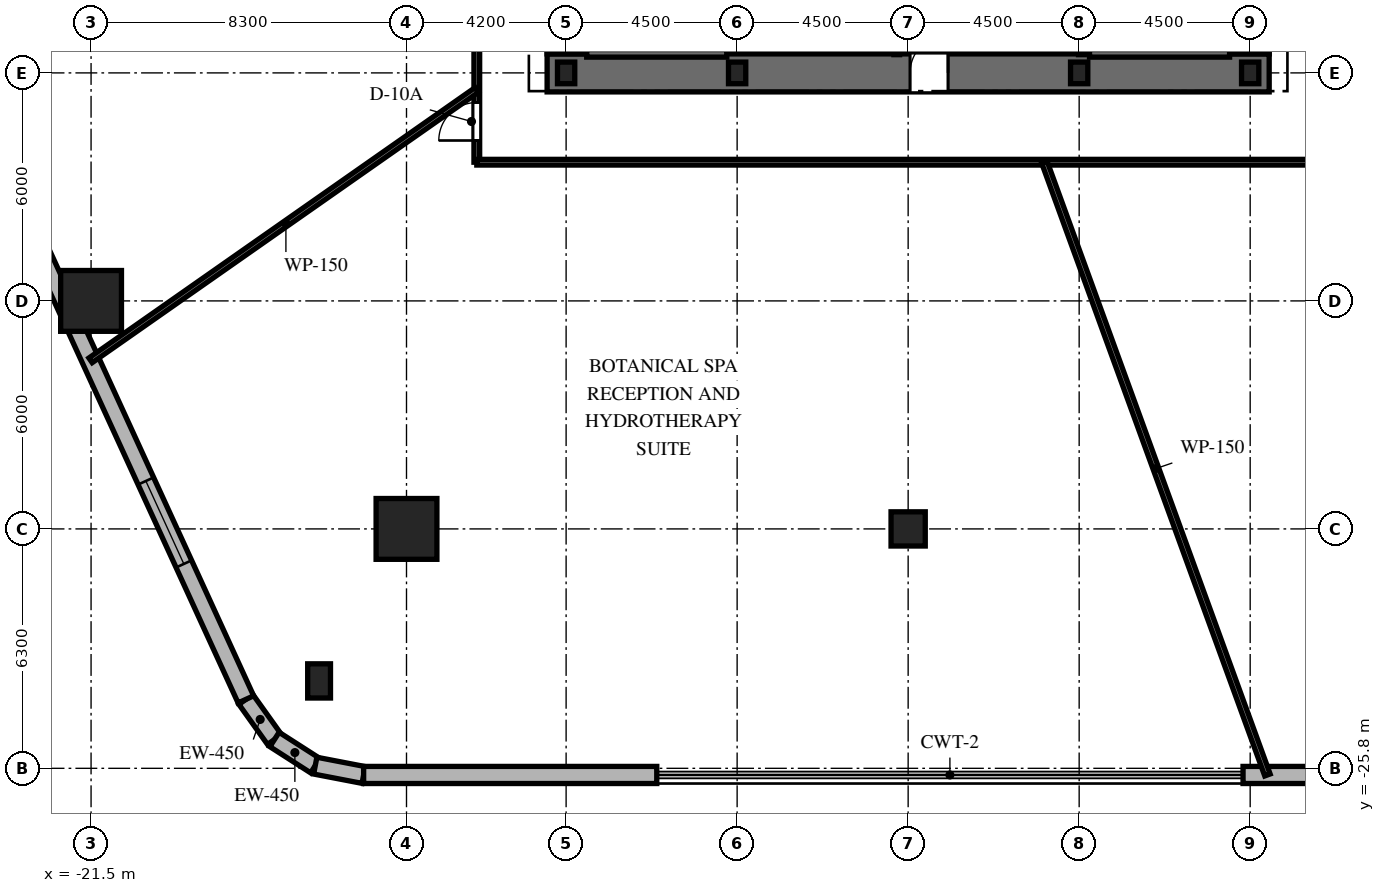
"""IFC4 building model, lengths in metres.
Left out: names, types, materials, properties, quantities, classifications, styles, units other than length and angle.
Written with IfcOpenShell. Run it as: python <this file> out.ifc"""

import sys

from ifc_helpers import new_model, si_unit, direction, frame, frame_2d, origin, origin_2d, place, context, subcontext, project, spatial, rectangle, circle, i_section, extrude, element, fill, save


model = new_model("IFC4")
c1 = context("Model", 3, precision=1e-05, world=origin(), true_north=direction((0.0, 1.0)))
c2 = subcontext(c1, "Body", "Model", "MODEL_VIEW")
j1 = project(units=[si_unit("LENGTHUNIT", "METRE"), si_unit("PLANEANGLEUNIT", "RADIAN")], contexts=[c1])
p1 = place(None, origin())
s1 = spatial("IfcSite", under=j1, at=p1, CompositionType="ELEMENT")
p2 = place(p1, origin())
s2 = spatial("IfcBuilding", under=s1, at=p2, CompositionType="ELEMENT")
p3 = place(p2, frame((0.0, 0.0, 23.4)))
s3 = spatial("IfcBuildingStorey", under=s2, at=p3, CompositionType="ELEMENT", Elevation=23.4)
p4 = place(p3, frame((-9.5, -7.5, 0.0), z_axis=(0.0, 0.0, 1.0), x_axis=(1.0, 0.0, 0.0)))
e1 = element("IfcWall", 1, at=p4, inside=s3, PredefinedType="SHEAR", context=c2, shape_type="SweptSolid", body=[
    extrude(rectangle(XDim=19.0, YDim=1.0, at=frame_2d((9.5, 0.0))), origin(), (0.0, 0.0, 1.0), 4.8),
])
p5 = place(p4, frame((9.55, 0.0, 0.0)))
e2 = element("IfcOpeningElement", 2, at=p5, cuts=e1, PredefinedType="OPENING", context=c2, shape_type="SweptSolid", body=[
    extrude(rectangle(XDim=1.0, YDim=2.15, at=frame_2d((0.5, 1.075))), frame((0.0, 0.51, 0.0), z_axis=(0.0, -1.0, 0.0), x_axis=(1.0, 0.0, 0.0)), (0.0, 0.0, 1.0), 1.02),
])
p6 = place(p3, frame((-9.0, -7.0, 0.0), z_axis=(0.0, 0.0, 1.0), x_axis=(0.0, 1.0, 0.0)))
e3 = element("IfcWall", 3, at=p6, inside=s3, PredefinedType="SHEAR", context=c2, shape_type="SweptSolid", body=[
    extrude(rectangle(XDim=14.0, YDim=1.0, at=frame_2d((7.0, 0.0))), origin(), (0.0, 0.0, 1.0), 4.8),
])
p7 = place(p6, frame((10.125, 0.0, 0.0)))
e4 = element("IfcOpeningElement", 4, at=p7, cuts=e3, PredefinedType="OPENING", context=c2, shape_type="SweptSolid", body=[
    extrude(rectangle(XDim=1.05, YDim=2.15, at=frame_2d((0.525, 1.075))), frame((0.0, 0.51, 0.0), z_axis=(0.0, -1.0, 0.0), x_axis=(1.0, 0.0, 0.0)), (0.0, 0.0, 1.0), 1.02),
])
p8 = place(p3, frame((9.0, -7.0, 0.0), z_axis=(0.0, 0.0, 1.0), x_axis=(0.0, 1.0, 0.0)))
e5 = element("IfcWall", 5, at=p8, inside=s3, PredefinedType="SHEAR", context=c2, shape_type="SweptSolid", body=[
    extrude(rectangle(XDim=14.0, YDim=1.0, at=frame_2d((7.0, 0.0))), origin(), (0.0, 0.0, 1.0), 4.8),
])
p9 = place(p8, frame((10.125, 0.0, 0.0)))
e6 = element("IfcOpeningElement", 6, at=p9, cuts=e5, PredefinedType="OPENING", context=c2, shape_type="SweptSolid", body=[
    extrude(rectangle(XDim=1.05, YDim=2.15, at=frame_2d((0.525, 1.075))), frame((0.0, 0.51, 0.0), z_axis=(0.0, -1.0, 0.0), x_axis=(1.0, 0.0, 0.0)), (0.0, 0.0, 1.0), 1.02),
])
for number, where, z_axis, x_axis in (
    (7, (-8.458, -6.985, 0.0), (0.0, 0.0, 1.0), (0.0, 1.0, 0.0)),
    (8, (-4.772, -6.985, 0.0), (0.0, 0.0, 1.0), (0.0, 1.0, 0.0)),
):
    element("IfcWall", number, at=place(p3, frame(where, z_axis=z_axis, x_axis=x_axis)), inside=s3, PredefinedType="SHEAR", context=c2, shape_type="SweptSolid", body=[
        extrude(rectangle(XDim=9.143, YDim=0.2, at=frame_2d((4.572, 0.0))), origin(), (0.0, 0.0, 1.0), 4.8),
    ])
p10 = place(p3, frame((-8.458, -6.985, 0.0), z_axis=(0.0, 0.0, 1.0), x_axis=(1.0, 0.0, 0.0)))
e9 = element("IfcWall", 9, at=p10, inside=s3, PredefinedType="SHEAR", context=c2, shape_type="SweptSolid", body=[
    extrude(rectangle(XDim=3.686, YDim=0.2, at=frame_2d((1.843, 0.0))), origin(), (0.0, 0.0, 1.0), 4.8),
])
for number, where, z_axis, x_axis in (
    (10, (4.772, -6.985, 0.0), (0.0, 0.0, 1.0), (0.0, 1.0, 0.0)),
    (11, (8.458, -6.985, 0.0), (0.0, 0.0, 1.0), (0.0, 1.0, 0.0)),
):
    element("IfcWall", number, at=place(p3, frame(where, z_axis=z_axis, x_axis=x_axis)), inside=s3, PredefinedType="SHEAR", context=c2, shape_type="SweptSolid", body=[
        extrude(rectangle(XDim=9.143, YDim=0.2, at=frame_2d((4.572, 0.0))), origin(), (0.0, 0.0, 1.0), 4.8),
    ])
p11 = place(p3, frame((4.772, -6.985, 0.0), z_axis=(0.0, 0.0, 1.0), x_axis=(1.0, 0.0, 0.0)))
e12 = element("IfcWall", 12, at=p11, inside=s3, PredefinedType="SHEAR", context=c2, shape_type="SweptSolid", body=[
    extrude(rectangle(XDim=3.686, YDim=0.2, at=frame_2d((1.843, 0.0))), origin(), (0.0, 0.0, 1.0), 4.8),
])
for number, where, z_axis, x_axis in (
    (13, (-9.0, -7.5, 0.0), (0.0, 0.0, 1.0), (1.0, 0.0, 0.0)),
    (14, (-4.5, -7.5, 0.0), (0.0, 0.0, 1.0), (1.0, 0.0, 0.0)),
    (15, (4.5, -7.5, 0.0), (0.0, 0.0, 1.0), (1.0, 0.0, 0.0)),
    (16, (9.0, -7.5, 0.0), (0.0, 0.0, 1.0), (1.0, 0.0, 0.0)),
):
    element("IfcColumn", number, at=place(p3, frame(where, z_axis=z_axis, x_axis=x_axis)), inside=s3, PredefinedType="COLUMN", context=c2, shape_type="SweptSolid", body=[
        extrude(i_section(OverallWidth=0.454, OverallDepth=0.569, WebThickness=0.078, FlangeThickness=0.125, at=origin_2d()), origin(), (0.0, 0.0, 1.0), 4.8),
    ])
for number, where, z_axis, x_axis in (
    (17, (-21.5, -13.5, 0.0), (0.0, 0.0, 1.0), (1.0, 0.0, 0.0)),
    (18, (-13.2, -19.5, 0.0), (0.0, 0.0, 1.0), (1.0, 0.0, 0.0)),
):
    element("IfcColumn", number, at=place(p3, frame(where, z_axis=z_axis, x_axis=x_axis)), inside=s3, PredefinedType="COLUMN", context=c2, shape_type="SweptSolid", body=[
        extrude(rectangle(XDim=1.6, YDim=1.6, at=origin_2d()), origin(), (0.0, 0.0, 1.0), 4.8),
    ])
p12 = place(p3, frame((0.0, -19.5, 0.0), z_axis=(0.0, 0.0, 1.0), x_axis=(1.0, 0.0, 0.0)))
e19 = element("IfcColumn", 19, at=p12, inside=s3, PredefinedType="COLUMN", context=c2, shape_type="SweptSolid", body=[
    extrude(circle(Radius=0.45, at=origin_2d()), origin(), (0.0, 0.0, 1.0), 4.8),
])
p13 = place(p3, frame((-15.5, -23.5, 0.0), z_axis=(0.0, 0.0, 1.0), x_axis=(1.0, 0.0, 0.0)))
e20 = element("IfcColumn", 20, at=p13, inside=s3, PredefinedType="PILASTER", context=c2, shape_type="SweptSolid", body=[
    extrude(rectangle(XDim=0.6, YDim=0.9, at=origin_2d()), origin(), (0.0, 0.0, 1.0), 4.8),
])
p14 = place(p3, frame((-17.427, -23.986, 0.0), z_axis=(0.0, 0.0, 1.0), x_axis=(0.580668110146, -0.814140372331, 0.0)))
e21 = element("IfcWall", 21, at=p14, inside=s3, PredefinedType="SOLIDWALL", context=c2, shape_type="SweptSolid", body=[
    extrude(rectangle(XDim=1.297, YDim=0.45, at=frame_2d((0.648, 0.0))), origin(), (0.0, 0.0, 1.0), 4.48),
])
p15 = place(p3, frame((-16.674, -25.042, 0.0), z_axis=(0.0, 0.0, 1.0), x_axis=(0.84167601366, -0.539982859014, 0.0)))
e22 = element("IfcWall", 22, at=p15, inside=s3, PredefinedType="SOLIDWALL", context=c2, shape_type="SweptSolid", body=[
    extrude(rectangle(XDim=1.275, YDim=0.45, at=frame_2d((0.637, 0.0))), origin(), (0.0, 0.0, 1.0), 4.48),
])
p16 = place(p3, frame((-15.601, -25.73, 0.0), z_axis=(0.0, 0.0, 1.0), x_axis=(0.981932506301, -0.189231480121, 0.0)))
e23 = element("IfcWall", 23, at=p16, inside=s3, PredefinedType="SOLIDWALL", context=c2, shape_type="SweptSolid", body=[
    extrude(rectangle(XDim=1.297, YDim=0.45, at=frame_2d((0.648, 0.0))), origin(), (0.0, 0.0, 1.0), 4.48),
])
p17 = place(p3, frame((-14.328, -25.975, 0.0), z_axis=(0.0, 0.0, 1.0), x_axis=(1.0, 0.0, 0.0)))
e24 = element("IfcWall", 24, at=p17, inside=s3, PredefinedType="SOLIDWALL", context=c2, shape_type="SweptSolid", body=[
    extrude(rectangle(XDim=7.713, YDim=0.45, at=frame_2d((3.856, 0.0))), origin(), (0.0, 0.0, 1.0), 4.48),
])
p18 = place(p3, frame((8.812, -25.975, 0.0), z_axis=(0.0, 0.0, 1.0), x_axis=(1.0, 0.0, 0.0)))
e25 = element("IfcWall", 25, at=p18, inside=s3, PredefinedType="SOLIDWALL", context=c2, shape_type="SweptSolid", body=[
    extrude(rectangle(XDim=7.714, YDim=0.45, at=frame_2d((3.857, 0.0))), origin(), (0.0, 0.0, 1.0), 4.48),
])
p19 = place(p3, frame((-27.21, -2.626, 0.0), z_axis=(0.0, 0.0, 1.0), x_axis=(0.416421752646, -0.909171559126, 0.0)))
e26 = element("IfcWall", 26, at=p19, inside=s3, PredefinedType="SOLIDWALL", context=c2, shape_type="SweptSolid", body=[
    extrude(rectangle(XDim=23.493, YDim=0.45, at=frame_2d((11.747, 0.0))), origin(), (0.0, 0.0, 1.0), 4.48),
])
p20 = place(p19, frame((17.173, 0.0, 0.85)))
e27 = element("IfcOpeningElement", 27, at=p20, cuts=e26, PredefinedType="OPENING", context=c2, shape_type="SweptSolid", body=[
    extrude(rectangle(XDim=2.4, YDim=2.4, at=frame_2d((1.2, 1.2))), frame((0.0, 0.235, 0.0), z_axis=(0.0, -1.0, 0.0), x_axis=(1.0, 0.0, 0.0)), (0.0, 0.0, 1.0), 0.47),
])
for number, where, z_axis, x_axis in (
    (28, (-0.3, -7.02, 0.0), (0.0, 0.0, 1.0), (0.0, 1.0, 0.0)),
    (29, (4.558, -7.02, 0.0), (0.0, 0.0, 1.0), (0.0, 1.0, 0.0)),
):
    element("IfcWall", number, at=place(p3, frame(where, z_axis=z_axis, x_axis=x_axis)), inside=s3, PredefinedType="PARTITIONING", context=c2, shape_type="SweptSolid", body=[
        extrude(rectangle(XDim=1.362, YDim=0.15, at=frame_2d((0.681, 0.0))), origin(), (0.0, 0.0, 1.0), 4.48),
    ])
p21 = place(p3, frame((-11.35, -9.85, 0.0), z_axis=(0.0, 0.0, 1.0), x_axis=(0.0, 1.0, 0.0)))
e30 = element("IfcWall", 30, at=p21, inside=s3, PredefinedType="PARTITIONING", context=c2, shape_type="SweptSolid", body=[
    extrude(rectangle(XDim=19.7, YDim=0.15, at=frame_2d((9.85, 0.0))), origin(), (0.0, 0.0, 1.0), 3.522),
])
p22 = place(p21, frame((0.571, 0.0, 0.0)))
e31 = element("IfcOpeningElement", 31, at=p22, cuts=e30, PredefinedType="OPENING", context=c2, shape_type="SweptSolid", body=[
    extrude(rectangle(XDim=1.0, YDim=2.03, at=frame_2d((0.5, 1.015))), frame((0.0, 0.085, 0.0), z_axis=(0.0, -1.0, 0.0), x_axis=(1.0, 0.0, 0.0)), (0.0, 0.0, 1.0), 0.17),
])
p23 = place(p21, frame((10.155, 0.0, 0.0)))
e32 = element("IfcOpeningElement", 32, at=p23, cuts=e30, PredefinedType="OPENING", context=c2, shape_type="SweptSolid", body=[
    extrude(rectangle(XDim=1.0, YDim=2.03, at=frame_2d((0.5, 1.015))), frame((0.0, 0.085, 0.0), z_axis=(0.0, -1.0, 0.0), x_axis=(1.0, 0.0, 0.0)), (0.0, 0.0, 1.0), 0.17),
])
p24 = place(p3, frame((11.35, -9.85, 0.0), z_axis=(0.0, 0.0, 1.0), x_axis=(-1.0, 0.0, 0.0)))
e33 = element("IfcWall", 33, at=p24, inside=s3, PredefinedType="PARTITIONING", context=c2, shape_type="SweptSolid", body=[
    extrude(rectangle(XDim=22.7, YDim=0.15, at=frame_2d((11.35, 0.0))), origin(), (0.0, 0.0, 1.0), 3.522),
])
p25 = place(p3, frame((-11.35, -7.948, 0.0), z_axis=(0.0, 0.0, 1.0), x_axis=(-0.819154257689, -0.573573275275, 0.0)))
e34 = element("IfcWall", 34, at=p25, inside=s3, PredefinedType="PARTITIONING", context=c2, shape_type="SweptSolid", body=[
    extrude(rectangle(XDim=12.407, YDim=0.15, at=frame_2d((6.203, 0.0))), origin(), (0.0, 0.0, 1.0), 3.522),
])
p26 = place(p3, frame((3.585, -9.85, 0.0), z_axis=(0.0, 0.0, 1.0), x_axis=(0.342013785947, -0.939694934658, 0.0)))
e35 = element("IfcWall", 35, at=p26, inside=s3, PredefinedType="PARTITIONING", context=c2, shape_type="SweptSolid", body=[
    extrude(rectangle(XDim=17.16, YDim=0.15, at=frame_2d((8.58, 0.0))), origin(), (0.0, 0.0, 1.0), 3.612),
])
p27 = place(p20, origin())
e36 = element("IfcWindow", 36, at=p27, inside=s3, PartitioningType="SINGLE_PANEL", PredefinedType="WINDOW", context=c2, shape_type="SweptSolid", body=[
    extrude(rectangle(XDim=2.4, YDim=2.4, at=frame_2d((1.2, 1.2))), frame((0.0, 0.03, 0.0), z_axis=(0.0, -1.0, 0.0), x_axis=(1.0, 0.0, 0.0)), (0.0, 0.0, 1.0), 0.06),
])
fill(e27, e36)
p28 = place(p5, origin())
e37 = element("IfcDoor", 37, at=p28, inside=s3, OperationType="SINGLE_SWING_RIGHT", PredefinedType="DOOR", context=c2, shape_type="SweptSolid", body=[
    extrude(rectangle(XDim=1.0, YDim=2.15, at=frame_2d((0.5, 1.075))), frame((0.0, 0.025, 0.0), z_axis=(0.0, -1.0, 0.0), x_axis=(1.0, 0.0, 0.0)), (0.0, 0.0, 1.0), 0.05),
])
fill(e2, e37)
p29 = place(p22, origin())
e38 = element("IfcDoor", 38, at=p29, inside=s3, OperationType="SINGLE_SWING_LEFT", PredefinedType="DOOR", context=c2, shape_type="SweptSolid", body=[
    extrude(rectangle(XDim=1.0, YDim=2.03, at=frame_2d((0.5, 1.015))), frame((0.0, 0.025, 0.0), z_axis=(0.0, -1.0, 0.0), x_axis=(1.0, 0.0, 0.0)), (0.0, 0.0, 1.0), 0.05),
])
fill(e31, e38)
save(model, sys.argv[1])
